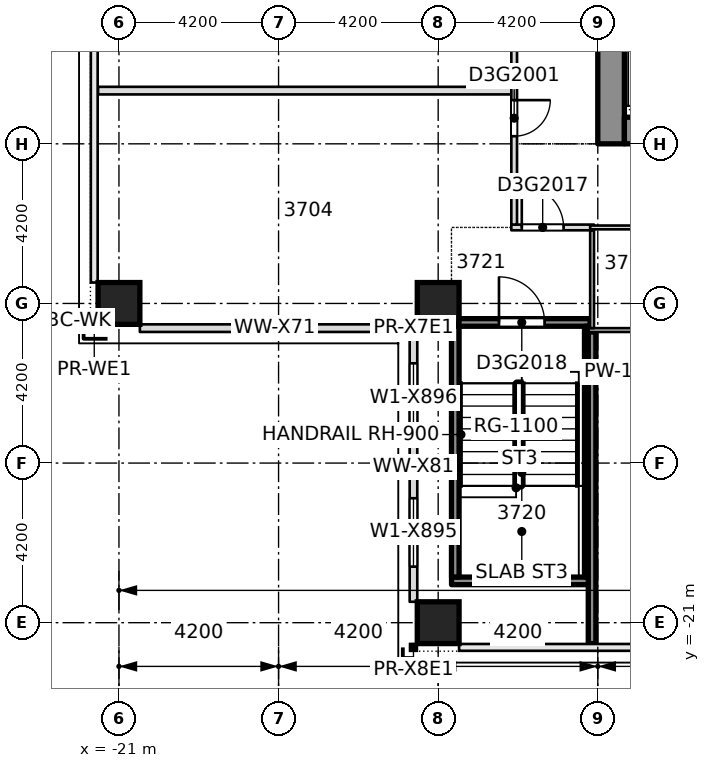
"""IFC4 building model, lengths in metres.
Left out: names, types, materials, properties, quantities, classifications, styles, units other than length and angle.
Written with IfcOpenShell. Run it as: python <this file> out.ifc"""

import sys

from ifc_helpers import new_model, si_unit, direction, frame, frame_2d, origin, origin_2d, place, context, subcontext, project, spatial, rectangle, extrude, element, fill, save


model = new_model("IFC4")
c1 = context("Model", 3, precision=1e-05, world=origin(), true_north=direction((0.0, 1.0)))
c2 = subcontext(c1, "Body", "Model", "MODEL_VIEW")
j1 = project(units=[si_unit("LENGTHUNIT", "METRE"), si_unit("PLANEANGLEUNIT", "RADIAN")], contexts=[c1])
p1 = place(None, origin())
s1 = spatial("IfcSite", under=j1, at=p1, CompositionType="ELEMENT")
p2 = place(p1, origin())
s2 = spatial("IfcBuilding", under=s1, at=p2, CompositionType="ELEMENT")
p3 = place(p2, frame((0.0, 0.0, 146.9)))
s3 = spatial("IfcBuildingStorey", under=s2, at=p3, CompositionType="ELEMENT", Elevation=146.9)
p4 = place(p3, frame((-8.05, -8.4, -0.4), z_axis=(0.0, 0.0, 1.0), x_axis=(0.0, 1.0, 0.0)))
e1 = element("IfcWall", 1, at=p4, inside=s3, PredefinedType="SOLIDWALL", context=c2, shape_type="SweptSolid", body=[
    extrude(rectangle(XDim=30.15, YDim=0.7, at=frame_2d((15.075, 0.0))), origin(), (0.0, 0.0, 1.0), 3.45),
])
p5 = place(p4, frame((19.3, 0.0, 0.4)))
e2 = element("IfcOpeningElement", 2, at=p5, cuts=e1, PredefinedType="OPENING", context=c2, shape_type="SweptSolid", body=[
    extrude(rectangle(XDim=1.2, YDim=2.1, at=frame_2d((0.6, 1.05))), frame((0.0, 0.36, 0.0), z_axis=(0.0, -1.0, 0.0), x_axis=(1.0, 0.0, 0.0)), (0.0, 0.0, 1.0), 0.72),
])
p6 = place(p3, frame((-7.7, -8.05, -0.4), z_axis=(0.0, 0.0, 1.0), x_axis=(1.0, 0.0, 0.0)))
e3 = element("IfcWall", 3, at=p6, inside=s3, PredefinedType="SHEAR", context=c2, shape_type="SweptSolid", body=[
    extrude(rectangle(XDim=15.4, YDim=0.7, at=frame_2d((7.7, 0.0))), origin(), (0.0, 0.0, 1.0), 3.45),
])
p7 = place(p6, frame((2.95, 0.0, 0.4)))
e4 = element("IfcOpeningElement", 4, at=p7, cuts=e3, PredefinedType="OPENING", context=c2, shape_type="SweptSolid", body=[
    extrude(rectangle(XDim=1.8, YDim=2.1, at=frame_2d((0.9, 1.05))), frame((0.0, 0.36, 0.0), z_axis=(0.0, -1.0, 0.0), x_axis=(1.0, 0.0, 0.0)), (0.0, 0.0, 1.0), 0.72),
])
p8 = place(p6, frame((10.65, 0.0, 0.4)))
e5 = element("IfcOpeningElement", 5, at=p8, cuts=e3, PredefinedType="OPENING", context=c2, shape_type="SweptSolid", body=[
    extrude(rectangle(XDim=1.8, YDim=2.1, at=frame_2d((0.9, 1.05))), frame((0.0, 0.36, 0.0), z_axis=(0.0, -1.0, 0.0), x_axis=(1.0, 0.0, 0.0)), (0.0, 0.0, 1.0), 0.72),
])
for number, where, z_axis, x_axis in (
    (6, (-12.6, -21.0, -0.4), (0.0, 0.0, 1.0), (1.0, 0.0, 0.0)),
    (7, (-21.0, -12.6, -0.4), (0.0, 0.0, 1.0), (1.0, 0.0, 0.0)),
    (8, (-12.6, -12.6, -0.4), (0.0, 0.0, 1.0), (1.0, 0.0, 0.0)),
):
    element("IfcColumn", number, at=place(p3, frame(where, z_axis=z_axis, x_axis=x_axis)), inside=s3, PredefinedType="COLUMN", context=c2, shape_type="SweptSolid", body=[
        extrude(rectangle(XDim=1.1, YDim=1.1, at=origin_2d()), origin(), (0.0, 0.0, 1.0), 3.45),
    ])
p9 = place(p3, frame((-12.248, -19.9, 0.0), z_axis=(0.0, 0.0, 1.0), x_axis=(1.0, 0.0, 0.0)))
e9 = element("IfcWall", 9, at=p9, inside=s3, PredefinedType="SOLIDWALL", context=c2, shape_type="SweptSolid", body=[
    extrude(rectangle(XDim=3.696, YDim=0.2, at=frame_2d((1.848, 0.0))), origin(), (0.0, 0.0, 1.0), 3.05),
])
p10 = place(p3, frame((-8.65, -13.3, 0.0), z_axis=(0.0, 0.0, 1.0), x_axis=(1.0, 0.0, 0.0)))
e10 = element("IfcWall", 10, at=p10, inside=s3, PredefinedType="PARTITIONING", context=c2, shape_type="SweptSolid", body=[
    extrude(rectangle(XDim=2.848, YDim=0.1, at=frame_2d((1.424, 0.0))), origin(), (0.0, 0.0, 1.0), 3.05),
])
p11 = place(p10, frame((1.75, 0.0, 0.0)))
e11 = element("IfcOpeningElement", 11, at=p11, cuts=e10, PredefinedType="OPENING", context=c2, shape_type="SweptSolid", body=[
    extrude(rectangle(XDim=0.85, YDim=2.1, at=frame_2d((0.425, 1.05))), frame((0.0, 0.06, 0.0), z_axis=(0.0, -1.0, 0.0), x_axis=(1.0, 0.0, 0.0)), (0.0, 0.0, 1.0), 0.12),
])
p12 = place(p3, frame((-12.348, -13.1, 0.0), z_axis=(0.0, 0.0, 1.0), x_axis=(1.0, 0.0, 0.0)))
e12 = element("IfcWall", 12, at=p12, inside=s3, PredefinedType="SOLIDWALL", context=c2, shape_type="SweptSolid", body=[
    extrude(rectangle(XDim=3.746, YDim=0.2, at=frame_2d((1.873, 0.0))), origin(), (0.0, 0.0, 1.0), 3.05),
])
p13 = place(p12, frame((1.348, 0.0, 0.0)))
e13 = element("IfcOpeningElement", 13, at=p13, cuts=e12, PredefinedType="OPENING", context=c2, shape_type="SweptSolid", body=[
    extrude(rectangle(XDim=1.2, YDim=2.1, at=frame_2d((0.6, 1.05))), frame((0.0, 0.11, 0.0), z_axis=(0.0, -1.0, 0.0), x_axis=(1.0, 0.0, 0.0)), (0.0, 0.0, 1.0), 0.22),
])
p14 = place(p3, frame((-10.675, -10.6, 0.0), z_axis=(0.0, 0.0, 1.0), x_axis=(1.0, 0.0, 0.0)))
e14 = element("IfcWall", 14, at=p14, inside=s3, PredefinedType="PARTITIONING", context=c2, shape_type="SweptSolid", body=[
    extrude(rectangle(XDim=2.175, YDim=0.15, at=frame_2d((1.087, 0.0))), origin(), (0.0, 0.0, 1.0), 3.05),
])
p15 = place(p14, frame((0.275, 0.0, 0.0)))
e15 = element("IfcOpeningElement", 15, at=p15, cuts=e14, PredefinedType="OPENING", context=c2, shape_type="SweptSolid", body=[
    extrude(rectangle(XDim=1.1, YDim=2.1, at=frame_2d((0.55, 1.05))), frame((0.0, 0.085, 0.0), z_axis=(0.0, -1.0, 0.0), x_axis=(1.0, 0.0, 0.0)), (0.0, 0.0, 1.0), 0.17),
])
p16 = place(p3, frame((-8.6, -10.6, 0.0), z_axis=(0.0, 0.0, 1.0), x_axis=(1.0, 0.0, 0.0)))
e16 = element("IfcWall", 16, at=p16, inside=s3, PredefinedType="PARTITIONING", context=c2, shape_type="SweptSolid", body=[
    extrude(rectangle(XDim=2.8, YDim=0.1, at=frame_2d((1.4, 0.0))), origin(), (0.0, 0.0, 1.0), 3.05),
])
p17 = place(p3, frame((-21.55, -7.0, 0.0), z_axis=(0.0, 0.0, 1.0), x_axis=(1.0, 0.0, 0.0)))
e17 = element("IfcWall", 17, at=p17, inside=s3, PredefinedType="PARTITIONING", context=c2, shape_type="SweptSolid", body=[
    extrude(rectangle(XDim=10.875, YDim=0.2, at=frame_2d((5.438, 0.0))), origin(), (0.0, 0.0, 1.0), 3.05),
])
p18 = place(p3, frame((-12.25, -12.998, 0.0), z_axis=(0.0, 0.0, 1.0), x_axis=(0.0, 1.0, 0.0)))
e18 = element("IfcWall", 18, at=p18, inside=s3, PredefinedType="PARTITIONING", context=c2, shape_type="SweptSolid", body=[
    extrude(rectangle(XDim=0.306, YDim=0.2, at=frame_2d((0.153, 0.0))), origin(), (0.0, 0.0, 1.0), 3.05),
])
p19 = place(p3, frame((-12.15, -19.798, 0.0), z_axis=(0.0, 0.0, 1.0), x_axis=(0.0, 1.0, 0.0)))
e19 = element("IfcWall", 19, at=p19, inside=s3, PredefinedType="SOLIDWALL", context=c2, shape_type="SweptSolid", body=[
    extrude(rectangle(XDim=6.596, YDim=0.2, at=frame_2d((3.298, 0.0))), origin(), (0.0, 0.0, 1.0), 3.05),
])
p20 = place(p3, frame((-10.6, -10.525, 0.0), z_axis=(0.0, 0.0, 1.0), x_axis=(0.0, 1.0, 0.0)))
e20 = element("IfcWall", 20, at=p20, inside=s3, PredefinedType="PARTITIONING", context=c2, shape_type="SweptSolid", body=[
    extrude(rectangle(XDim=13.875, YDim=0.15, at=frame_2d((6.938, 0.0))), origin(), (0.0, 0.0, 1.0), 3.05),
])
p21 = place(p20, frame((2.325, 0.0, 0.0)))
e21 = element("IfcOpeningElement", 21, at=p21, cuts=e20, PredefinedType="OPENING", context=c2, shape_type="SweptSolid", body=[
    extrude(rectangle(XDim=0.95, YDim=2.1, at=frame_2d((0.475, 1.05))), frame((0.0, 0.085, 0.0), z_axis=(0.0, -1.0, 0.0), x_axis=(1.0, 0.0, 0.0)), (0.0, 0.0, 1.0), 0.17),
])
p22 = place(p20, frame((9.975, 0.0, 0.0)))
e22 = element("IfcOpeningElement", 22, at=p22, cuts=e20, PredefinedType="OPENING", context=c2, shape_type="SweptSolid", body=[
    extrude(rectangle(XDim=1.1, YDim=2.1, at=frame_2d((0.55, 1.05))), frame((0.0, 0.085, 0.0), z_axis=(0.0, -1.0, 0.0), x_axis=(1.0, 0.0, 0.0)), (0.0, 0.0, 1.0), 0.17),
])
p23 = place(p20, frame((4.825, 0.0, 0.0)))
e23 = element("IfcOpeningElement", 23, at=p23, cuts=e20, PredefinedType="OPENING", context=c2, shape_type="SweptSolid", body=[
    extrude(rectangle(XDim=1.0, YDim=2.1, at=frame_2d((0.5, 1.05))), frame((0.0, 0.085, 0.0), z_axis=(0.0, -1.0, 0.0), x_axis=(1.0, 0.0, 0.0)), (0.0, 0.0, 1.0), 0.17),
])
p24 = place(p3, frame((-8.65, -19.798, 0.0), z_axis=(0.0, 0.0, 1.0), x_axis=(0.0, 1.0, 0.0)))
e24 = element("IfcWall", 24, at=p24, inside=s3, PredefinedType="SOLIDWALL", context=c2, shape_type="SweptSolid", body=[
    extrude(rectangle(XDim=6.596, YDim=0.2, at=frame_2d((3.298, 0.0))), origin(), (0.0, 0.0, 1.0), 3.05),
])
p25 = place(p3, frame((-8.55, -13.25, 0.0), z_axis=(0.0, 0.0, 1.0), x_axis=(0.0, 1.0, 0.0)))
e25 = element("IfcWall", 25, at=p25, inside=s3, PredefinedType="PARTITIONING", context=c2, shape_type="SweptSolid", body=[
    extrude(rectangle(XDim=2.575, YDim=0.1, at=frame_2d((1.288, 0.0))), origin(), (0.0, 0.0, 1.0), 3.05),
])
p26 = place(p3, frame((-20.45, -13.25, 0.0), z_axis=(0.0, 0.0, 1.0), x_axis=(1.0, 0.0, 0.0)))
e26 = element("IfcWall", 26, at=p26, inside=s3, PredefinedType="STANDARD", context=c2, shape_type="SweptSolid", body=[
    extrude(rectangle(XDim=7.1, YDim=0.2, at=frame_2d((3.55, 0.0))), origin(), (0.0, 0.0, 1.0), 3.05),
])
p27 = place(p3, frame((-13.25, -13.35, 0.0), z_axis=(0.0, 0.0, 1.0), x_axis=(0.0, -1.0, 0.0)))
e27 = element("IfcWall", 27, at=p27, inside=s3, PredefinedType="STANDARD", context=c2, shape_type="SweptSolid", body=[
    extrude(rectangle(XDim=7.1, YDim=0.2, at=frame_2d((3.55, 0.0))), origin(), (0.0, 0.0, 1.0), 3.05),
])
p28 = place(p27, frame((4.375, 0.0, 0.2)))
e28 = element("IfcOpeningElement", 28, at=p28, cuts=e27, PredefinedType="OPENING", context=c2, shape_type="SweptSolid", body=[
    extrude(rectangle(XDim=1.8, YDim=2.65, at=frame_2d((0.9, 1.325))), frame((0.0, 0.11, 0.0), z_axis=(0.0, -1.0, 0.0), x_axis=(1.0, 0.0, 0.0)), (0.0, 0.0, 1.0), 0.22),
])
p29 = place(p27, frame((0.825, 0.0, 0.2)))
e29 = element("IfcOpeningElement", 29, at=p29, cuts=e27, PredefinedType="OPENING", context=c2, shape_type="SweptSolid", body=[
    extrude(rectangle(XDim=1.8, YDim=2.65, at=frame_2d((0.9, 1.325))), frame((0.0, 0.11, 0.0), z_axis=(0.0, -1.0, 0.0), x_axis=(1.0, 0.0, 0.0)), (0.0, 0.0, 1.0), 0.22),
])
p30 = place(p3, frame((-8.55, -21.55, 0.0), z_axis=(0.0, 0.0, 1.0), x_axis=(0.0, 1.0, 0.0)))
e30 = element("IfcWall", 30, at=p30, inside=s3, PredefinedType="SOLIDWALL", context=c2, shape_type="SweptSolid", body=[
    extrude(rectangle(XDim=8.2, YDim=0.2, at=frame_2d((4.1, 0.0))), origin(), (0.0, 0.0, 1.0), 3.05),
])
p31 = place(p21, origin())
e31 = element("IfcDoor", 31, at=p31, inside=s3, OperationType="SINGLE_SWING_RIGHT", PredefinedType="DOOR", context=c2, shape_type="SweptSolid", body=[
    extrude(rectangle(XDim=0.95, YDim=2.1, at=frame_2d((0.475, 1.05))), frame((0.0, 0.025, 0.0), z_axis=(0.0, -1.0, 0.0), x_axis=(1.0, 0.0, 0.0)), (0.0, 0.0, 1.0), 0.05),
])
fill(e21, e31)
p32 = place(p15, origin())
e32 = element("IfcDoor", 32, at=p32, inside=s3, OperationType="SINGLE_SWING_RIGHT", PredefinedType="DOOR", context=c2, shape_type="SweptSolid", body=[
    extrude(rectangle(XDim=1.1, YDim=2.1, at=frame_2d((0.55, 1.05))), frame((0.0, 0.025, 0.0), z_axis=(0.0, -1.0, 0.0), x_axis=(1.0, 0.0, 0.0)), (0.0, 0.0, 1.0), 0.05),
])
fill(e15, e32)
p33 = place(p13, origin())
e33 = element("IfcDoor", 33, at=p33, inside=s3, OperationType="SINGLE_SWING_RIGHT", PredefinedType="DOOR", context=c2, shape_type="SweptSolid", body=[
    extrude(rectangle(XDim=1.2, YDim=2.1, at=frame_2d((0.6, 1.05))), frame((0.0, 0.025, 0.0), z_axis=(0.0, -1.0, 0.0), x_axis=(1.0, 0.0, 0.0)), (0.0, 0.0, 1.0), 0.05),
])
fill(e13, e33)
p34 = place(p28, origin())
e34 = element("IfcWindow", 34, at=p34, inside=s3, PartitioningType="SINGLE_PANEL", PredefinedType="WINDOW", context=c2, shape_type="SweptSolid", body=[
    extrude(rectangle(XDim=1.8, YDim=2.65, at=frame_2d((0.9, 1.325))), frame((0.0, 0.03, 0.0), z_axis=(0.0, -1.0, 0.0), x_axis=(1.0, 0.0, 0.0)), (0.0, 0.0, 1.0), 0.06),
])
fill(e28, e34)
p35 = place(p29, origin())
e35 = element("IfcWindow", 35, at=p35, inside=s3, PartitioningType="SINGLE_PANEL", PredefinedType="WINDOW", context=c2, shape_type="SweptSolid", body=[
    extrude(rectangle(XDim=1.8, YDim=2.65, at=frame_2d((0.9, 1.325))), frame((0.0, 0.03, 0.0), z_axis=(0.0, -1.0, 0.0), x_axis=(1.0, 0.0, 0.0)), (0.0, 0.0, 1.0), 0.06),
])
fill(e29, e35)
save(model, sys.argv[1])
